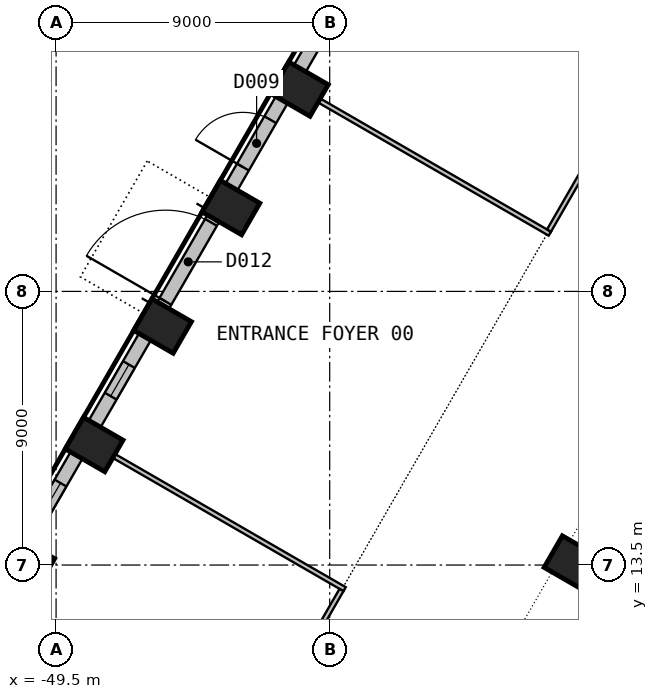
"""IFC4 building model, lengths in metres.
Left out: names, types, materials, properties, quantities, classifications, styles, units other than length and angle.
Written with IfcOpenShell. Run it as: python <this file> out.ifc"""

import sys

from ifc_helpers import new_model, si_unit, direction, frame, frame_2d, origin, origin_2d, place, context, subcontext, project, spatial, rectangle, extrude, element, fill, save


model = new_model("IFC4")
c1 = context("Model", 3, precision=1e-05, world=origin(), true_north=direction((0.0, 1.0)))
c2 = subcontext(c1, "Body", "Model", "MODEL_VIEW")
j1 = project(units=[si_unit("LENGTHUNIT", "METRE"), si_unit("PLANEANGLEUNIT", "RADIAN")], contexts=[c1])
p1 = place(None, origin())
s1 = spatial("IfcSite", under=j1, at=p1, CompositionType="ELEMENT")
p2 = place(p1, origin())
s2 = spatial("IfcBuilding", under=s1, at=p2, CompositionType="ELEMENT")
p3 = place(p2, origin())
s3 = spatial("IfcBuildingStorey", under=s2, at=p3, CompositionType="ELEMENT", Elevation=0.0)
for number, where, z_axis, x_axis in (
    (1, (-41.498, 29.155, 0.0), (0.0, 0.0, 1.0), (-0.5, -0.866, 0.0)),
    (2, (-43.748, 25.258, 0.0), (0.0, 0.0, 1.0), (-0.5, -0.866, 0.0)),
    (3, (-45.998, 21.361, 0.0), (0.0, 0.0, 1.0), (-0.5, -0.866, 0.0)),
    (4, (-48.248, 17.463, 0.0), (0.0, 0.0, 1.0), (-0.5, -0.866, 0.0)),
    (5, (-50.498, 13.566, 0.0), (0.0, 0.0, 1.0), (-0.5, -0.866, 0.0)),
):
    element("IfcColumn", number, at=place(p3, frame(where, z_axis=z_axis, x_axis=x_axis)), inside=s3, PredefinedType="COLUMN", context=c2, shape_type="SweptSolid", body=[
        extrude(rectangle(XDim=1.2, YDim=1.5, at=origin_2d()), origin(), (0.0, 0.0, 1.0), 6.0),
    ])
p4 = place(p3, frame((-32.498, 13.566, 0.0), z_axis=(0.0, 0.0, 1.0), x_axis=(-0.5, -0.866025403784, 0.0)))
e6 = element("IfcColumn", 6, at=p4, inside=s3, PredefinedType="COLUMN", context=c2, shape_type="SweptSolid", body=[
    extrude(rectangle(XDim=1.2, YDim=1.5, at=origin_2d()), origin(), (0.0, 0.0, 1.0), 5.6),
])
p5 = place(p3, frame((-39.829, 32.694, 0.0), z_axis=(0.0, 0.0, 1.0), x_axis=(-0.499991515992, -0.866030301974, 0.0)))
e7 = element("IfcWall", 7, at=p5, inside=s3, PredefinedType="SOLIDWALL", context=c2, shape_type="SweptSolid", body=[
    extrude(rectangle(XDim=3.299, YDim=0.45, at=frame_2d((1.649, 0.0))), origin(), (0.0, 0.0, 1.0), 6.0),
])
p6 = place(p5, frame((1.05, 0.0, 0.9)))
e8 = element("IfcOpeningElement", 8, at=p6, cuts=e7, PredefinedType="OPENING", context=c2, shape_type="SweptSolid", body=[
    extrude(rectangle(XDim=1.2, YDim=4.2, at=frame_2d((0.6, 2.1))), frame((0.0, 0.235, 0.0), z_axis=(0.0, -1.0, 0.0), x_axis=(1.0, 0.0, 0.0)), (0.0, 0.0, 1.0), 0.47),
])
p7 = place(p3, frame((-43.729, 25.94, 0.0), z_axis=(0.0, 0.0, 1.0), x_axis=(0.49995947208, 0.866048801325, 0.0)))
e9 = element("IfcWall", 9, at=p7, inside=s3, PredefinedType="SOLIDWALL", context=c2, shape_type="SweptSolid", body=[
    extrude(rectangle(XDim=3.299, YDim=0.45, at=frame_2d((1.649, 0.0))), origin(), (0.0, 0.0, 1.0), 6.0),
])
p8 = place(p7, frame((0.75, 0.0, 0.0)))
e10 = element("IfcOpeningElement", 10, at=p8, cuts=e9, PredefinedType="OPENING", context=c2, shape_type="SweptSolid", body=[
    extrude(rectangle(XDim=1.8, YDim=2.4, at=frame_2d((0.9, 1.2))), frame((0.0, 0.235, 0.0), z_axis=(0.0, -1.0, 0.0), x_axis=(1.0, 0.0, 0.0)), (0.0, 0.0, 1.0), 0.47),
])
p9 = place(p3, frame((-45.979, 22.043, 0.0), z_axis=(0.0, 0.0, 1.0), x_axis=(0.499991515992, 0.866030301974, 0.0)))
e11 = element("IfcWall", 11, at=p9, inside=s3, PredefinedType="SOLIDWALL", context=c2, shape_type="SweptSolid", body=[
    extrude(rectangle(XDim=3.299, YDim=0.45, at=frame_2d((1.649, 0.0))), origin(), (0.0, 0.0, 1.0), 6.0),
])
p10 = place(p9, frame((0.149, 0.0, 0.0)))
e12 = element("IfcOpeningElement", 12, at=p10, cuts=e11, PredefinedType="OPENING", context=c2, shape_type="SweptSolid", body=[
    extrude(rectangle(XDim=3.0, YDim=4.2, at=frame_2d((1.5, 2.1))), frame((0.0, 0.235, 0.0), z_axis=(0.0, -1.0, 0.0), x_axis=(1.0, 0.0, 0.0)), (0.0, 0.0, 1.0), 0.47),
])
p11 = place(p3, frame((-46.579, 21.003, 0.0), z_axis=(0.0, 0.0, 1.0), x_axis=(-0.499991515992, -0.866030301974, 0.0)))
e13 = element("IfcWall", 13, at=p11, inside=s3, PredefinedType="SOLIDWALL", context=c2, shape_type="SweptSolid", body=[
    extrude(rectangle(XDim=3.299, YDim=0.45, at=frame_2d((1.649, 0.0))), origin(), (0.0, 0.0, 1.0), 6.0),
])
p12 = place(p11, frame((1.05, 0.0, 0.9)))
e14 = element("IfcOpeningElement", 14, at=p12, cuts=e13, PredefinedType="OPENING", context=c2, shape_type="SweptSolid", body=[
    extrude(rectangle(XDim=1.2, YDim=4.2, at=frame_2d((0.6, 2.1))), frame((0.0, 0.235, 0.0), z_axis=(0.0, -1.0, 0.0), x_axis=(1.0, 0.0, 0.0)), (0.0, 0.0, 1.0), 0.47),
])
p13 = place(p3, frame((-48.829, 17.106, 0.0), z_axis=(0.0, 0.0, 1.0), x_axis=(-0.49995947208, -0.866048801325, 0.0)))
e15 = element("IfcWall", 15, at=p13, inside=s3, PredefinedType="SOLIDWALL", context=c2, shape_type="SweptSolid", body=[
    extrude(rectangle(XDim=3.299, YDim=0.45, at=frame_2d((1.649, 0.0))), origin(), (0.0, 0.0, 1.0), 6.0),
])
p14 = place(p13, frame((1.05, 0.0, 0.9)))
e16 = element("IfcOpeningElement", 16, at=p14, cuts=e15, PredefinedType="OPENING", context=c2, shape_type="SweptSolid", body=[
    extrude(rectangle(XDim=1.2, YDim=4.2, at=frame_2d((0.6, 2.1))), frame((0.0, 0.235, 0.0), z_axis=(0.0, -1.0, 0.0), x_axis=(1.0, 0.0, 0.0)), (0.0, 0.0, 1.0), 0.47),
])
p15 = place(p3, frame((-40.009, 12.707, 0.0), z_axis=(0.0, 0.0, 1.0), x_axis=(-0.866024693403, 0.500001230415, 0.0)))
e17 = element("IfcWall", 17, at=p15, inside=s3, PredefinedType="PARTITIONING", context=c2, shape_type="SweptSolid", body=[
    extrude(rectangle(XDim=8.743, YDim=0.15, at=frame_2d((4.372, 0.0))), origin(), (0.0, 0.0, 1.0), 6.0),
])
p16 = place(p3, frame((-45.26, 3.762, 0.0), z_axis=(0.0, 0.0, 1.0), x_axis=(0.499979704663, 0.866037120986, 0.0)))
e18 = element("IfcWall", 18, at=p16, inside=s3, PredefinedType="PARTITIONING", context=c2, shape_type="SweptSolid", body=[
    extrude(rectangle(XDim=10.296, YDim=0.15, at=frame_2d((5.148, 0.0))), origin(), (0.0, 0.0, 1.0), 6.0),
])
p17 = place(p16, frame((4.648, 0.0, 0.0)))
e19 = element("IfcOpeningElement", 19, at=p17, cuts=e18, PredefinedType="OPENING", context=c2, shape_type="SweptSolid", body=[
    extrude(rectangle(XDim=1.0, YDim=2.1, at=frame_2d((0.5, 1.05))), frame((0.0, 0.085, 0.0), z_axis=(0.0, -1.0, 0.0), x_axis=(1.0, 0.0, 0.0)), (0.0, 0.0, 1.0), 0.17),
])
p18 = place(p3, frame((-40.831, 28.77, 0.0), z_axis=(0.0, 0.0, 1.0), x_axis=(0.866017712198, -0.500013321982, 0.0)))
e20 = element("IfcWall", 20, at=p18, inside=s3, PredefinedType="PARTITIONING", context=c2, shape_type="SweptSolid", body=[
    extrude(rectangle(XDim=8.743, YDim=0.15, at=frame_2d((4.372, 0.0))), origin(), (0.0, 0.0, 1.0), 6.0),
])
p19 = place(p3, frame((-33.287, 24.501, 0.0), z_axis=(0.0, 0.0, 1.0), x_axis=(0.500064997195, 0.865987874384, 0.0)))
e21 = element("IfcWall", 21, at=p19, inside=s3, PredefinedType="PARTITIONING", context=c2, shape_type="SweptSolid", body=[
    extrude(rectangle(XDim=10.447, YDim=0.15, at=frame_2d((5.223, 0.0))), origin(), (0.0, 0.0, 1.0), 6.0),
])
p20 = place(p19, frame((4.723, 0.0, 0.0)))
e22 = element("IfcOpeningElement", 22, at=p20, cuts=e21, PredefinedType="OPENING", context=c2, shape_type="SweptSolid", body=[
    extrude(rectangle(XDim=1.0, YDim=2.1, at=frame_2d((0.5, 1.05))), frame((0.0, 0.085, 0.0), z_axis=(0.0, -1.0, 0.0), x_axis=(1.0, 0.0, 0.0)), (0.0, 0.0, 1.0), 0.17),
])
p21 = place(p8, origin())
e23 = element("IfcDoor", 23, at=p21, inside=s3, OperationType="DOUBLE_DOOR_SINGLE_SWING", PredefinedType="DOOR", context=c2, shape_type="SweptSolid", body=[
    extrude(rectangle(XDim=1.8, YDim=2.4, at=frame_2d((0.9, 1.2))), frame((0.0, 0.025, 0.0), z_axis=(0.0, -1.0, 0.0), x_axis=(1.0, 0.0, 0.0)), (0.0, 0.0, 1.0), 0.05),
])
fill(e10, e23)
p22 = place(p10, origin())
e24 = element("IfcDoor", 24, at=p22, inside=s3, OperationType="DOUBLE_DOOR_SINGLE_SWING", PredefinedType="DOOR", context=c2, shape_type="SweptSolid", body=[
    extrude(rectangle(XDim=3.0, YDim=4.2, at=frame_2d((1.5, 2.1))), frame((0.0, 0.025, 0.0), z_axis=(0.0, -1.0, 0.0), x_axis=(1.0, 0.0, 0.0)), (0.0, 0.0, 1.0), 0.05),
])
fill(e12, e24)
p23 = place(p12, origin())
e25 = element("IfcWindow", 25, at=p23, inside=s3, PartitioningType="SINGLE_PANEL", PredefinedType="WINDOW", context=c2, shape_type="SweptSolid", body=[
    extrude(rectangle(XDim=1.2, YDim=4.2, at=frame_2d((0.6, 2.1))), frame((0.0, 0.03, 0.0), z_axis=(0.0, -1.0, 0.0), x_axis=(1.0, 0.0, 0.0)), (0.0, 0.0, 1.0), 0.06),
])
fill(e14, e25)
p24 = place(p14, origin())
e26 = element("IfcWindow", 26, at=p24, inside=s3, PartitioningType="SINGLE_PANEL", PredefinedType="WINDOW", context=c2, shape_type="SweptSolid", body=[
    extrude(rectangle(XDim=1.2, YDim=4.2, at=frame_2d((0.6, 2.1))), frame((0.0, 0.03, 0.0), z_axis=(0.0, -1.0, 0.0), x_axis=(1.0, 0.0, 0.0)), (0.0, 0.0, 1.0), 0.06),
])
fill(e16, e26)
save(model, sys.argv[1])
